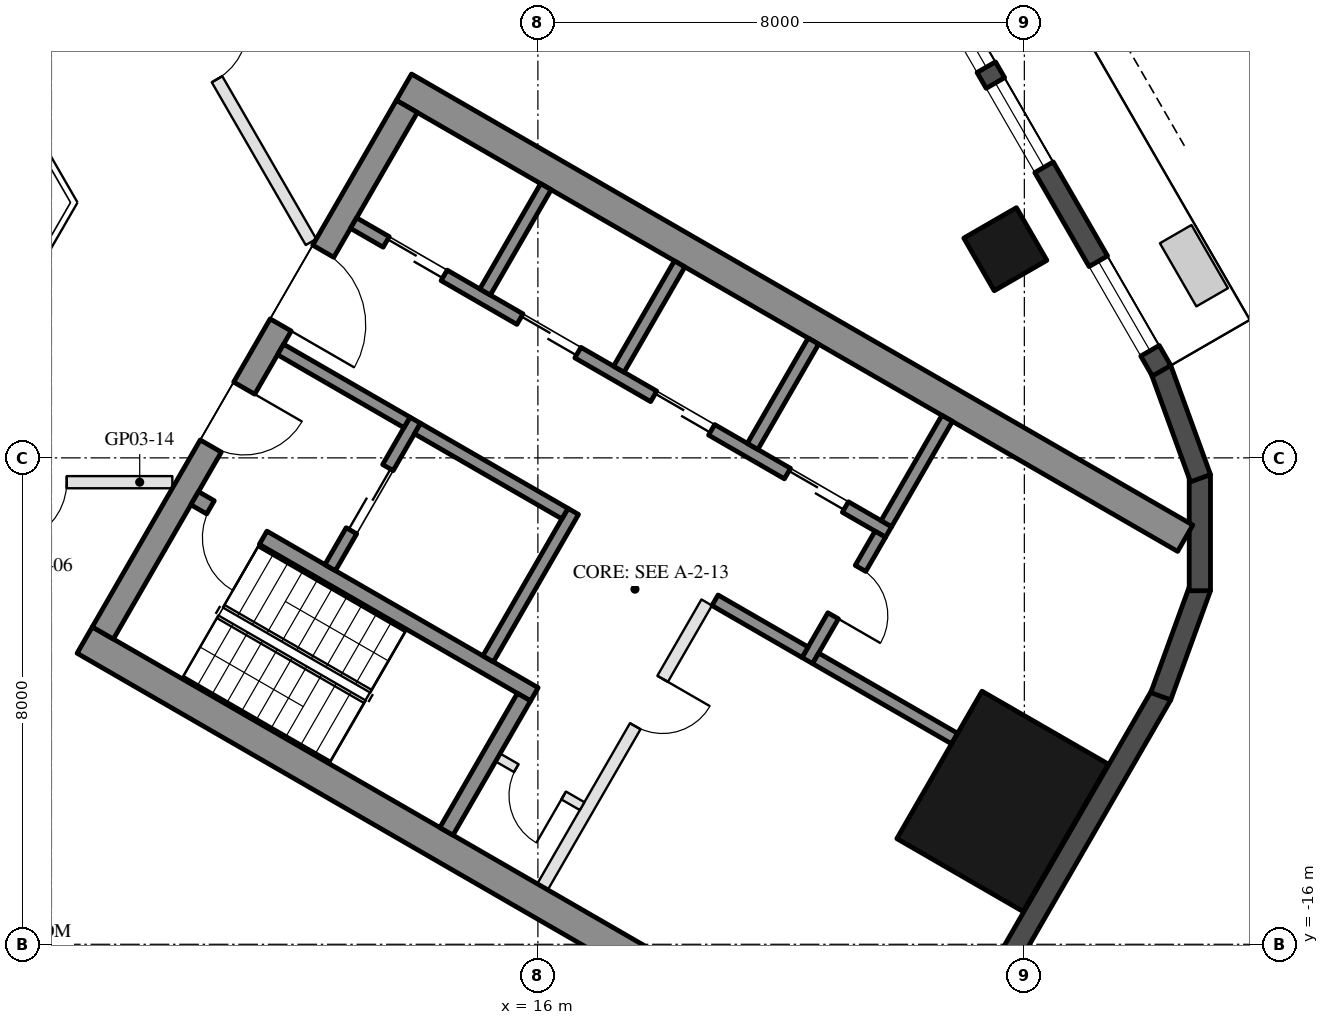
"""IFC4 building model, lengths in metres.
Left out: names, types, materials, properties, quantities, classifications, styles, units other than length and angle.
Written with IfcOpenShell. Run it as: python <this file> out.ifc"""

import sys

from ifc_helpers import new_model, si_unit, direction, frame, frame_2d, origin, origin_2d, place, context, subcontext, project, spatial, rectangle, hollow_rectangle, extrude, element, fill, save


model = new_model("IFC4")
c1 = context("Model", 3, precision=1e-05, world=origin(), true_north=direction((0.0, 1.0)))
c2 = subcontext(c1, "Body", "Model", "MODEL_VIEW")
j1 = project(units=[si_unit("LENGTHUNIT", "METRE"), si_unit("PLANEANGLEUNIT", "RADIAN")], contexts=[c1])
p1 = place(None, origin())
s1 = spatial("IfcSite", under=j1, at=p1, CompositionType="ELEMENT")
p2 = place(p1, origin())
s2 = spatial("IfcBuilding", under=s1, at=p2, CompositionType="ELEMENT")
p3 = place(p2, frame((0.0, 0.0, 68.7)))
s3 = spatial("IfcBuildingStorey", under=s2, at=p3, CompositionType="ELEMENT", Elevation=68.7)
p4 = place(p3, frame((23.688, -4.568, 0.0), z_axis=(0.0, 0.0, 1.0), x_axis=(-0.5, 0.866025403784, 0.0)))
e1 = element("IfcColumn", 1, at=p4, inside=s3, PredefinedType="COLUMN", context=c2, shape_type="SweptSolid", body=[
    extrude(hollow_rectangle(XDim=1.0, YDim=1.0, WallThickness=0.045, at=origin_2d()), origin(), (0.0, 0.0, 1.0), 3.7),
])
p5 = place(p3, frame((23.643, -13.65, 0.0), z_axis=(0.0, 0.0, 1.0), x_axis=(0.5, 0.866025403784, 0.0)))
e2 = element("IfcColumn", 2, at=p5, inside=s3, PredefinedType="COLUMN", context=c2, shape_type="SweptSolid", body=[
    extrude(hollow_rectangle(XDim=2.8, YDim=2.4, WallThickness=0.07, at=origin_2d()), origin(), (0.0, 0.0, 1.0), 3.7),
])
p6 = place(p3, frame((23.427, -16.792, 0.0), z_axis=(0.0, 0.0, 1.0), x_axis=(0.500018773155, 0.866014564827, 0.0)))
e3 = element("IfcWall", 3, at=p6, inside=s3, PredefinedType="SOLIDWALL", context=c2, shape_type="SweptSolid", body=[
    extrude(rectangle(XDim=5.658, YDim=0.35, at=frame_2d((2.829, 0.0))), origin(), (0.0, 0.0, 1.0), 3.55),
])
for number, where, z_axis, x_axis in (
    (4, (26.244, -11.92, 0.0), (0.0, 0.0, 1.0), (0.342, 0.94, 0.0)),
    (5, (26.886, -10.185, 0.0), (0.0, 0.0, 1.0), (0.0, 1.0, 0.0)),
    (6, (26.897, -8.335, 0.0), (0.0, 0.0, 1.0), (-0.342, 0.94, 0.0)),
):
    element("IfcWall", number, at=place(p3, frame(where, z_axis=z_axis, x_axis=x_axis)), inside=s3, PredefinedType="SOLIDWALL", context=c2, shape_type="SweptSolid", body=[
        extrude(rectangle(XDim=1.91, YDim=0.35, at=frame_2d((0.955, 0.0))), origin(), (0.0, 0.0, 1.0), 3.55),
    ])
p7 = place(p3, frame((26.257, -6.567, 0.0), z_axis=(0.0, 0.0, 1.0), x_axis=(-0.500023526245, 0.866011820475, 0.0)))
e7 = element("IfcWall", 7, at=p7, inside=s3, PredefinedType="SOLIDWALL", context=c2, shape_type="SweptSolid", body=[
    extrude(rectangle(XDim=11.816, YDim=0.35, at=frame_2d((5.908, 0.0))), origin(), (0.0, 0.0, 1.0), 3.55),
])
p8 = place(p7, frame((0.38, 0.0, 0.3)))
e8 = element("IfcOpeningElement", 8, at=p8, cuts=e7, PredefinedType="OPENING", context=c2, shape_type="SweptSolid", body=[
    extrude(rectangle(XDim=1.7, YDim=2.65, at=frame_2d((0.85, 1.325))), frame((0.0, 0.185, 0.0), z_axis=(0.0, -1.0, 0.0), x_axis=(1.0, 0.0, 0.0)), (0.0, 0.0, 1.0), 0.37),
])
p9 = place(p7, frame((7.666, 0.0, 0.0)))
e9 = element("IfcOpeningElement", 9, at=p9, cuts=e7, PredefinedType="OPENING", context=c2, shape_type="SweptSolid", body=[
    extrude(rectangle(XDim=2.4, YDim=2.4, at=frame_2d((1.2, 1.2))), frame((0.0, 0.185, 0.0), z_axis=(0.0, -1.0, 0.0), x_axis=(1.0, 0.0, 0.0)), (0.0, 0.0, 1.0), 0.37),
])
p10 = place(p7, frame((3.865, 0.0, 0.3)))
e10 = element("IfcOpeningElement", 10, at=p10, cuts=e7, PredefinedType="OPENING", context=c2, shape_type="SweptSolid", body=[
    extrude(rectangle(XDim=1.6, YDim=2.65, at=frame_2d((0.8, 1.325))), frame((0.0, 0.185, 0.0), z_axis=(0.0, -1.0, 0.0), x_axis=(1.0, 0.0, 0.0)), (0.0, 0.0, 1.0), 0.37),
])
p11 = place(p7, frame((5.765, 0.0, 0.3)))
e11 = element("IfcOpeningElement", 11, at=p11, cuts=e7, PredefinedType="OPENING", context=c2, shape_type="SweptSolid", body=[
    extrude(rectangle(XDim=1.6, YDim=2.65, at=frame_2d((0.8, 1.325))), frame((0.0, 0.185, 0.0), z_axis=(0.0, -1.0, 0.0), x_axis=(1.0, 0.0, 0.0)), (0.0, 0.0, 1.0), 0.37),
])
for number, where, z_axis, x_axis in (
    (12, (8.547, -10.997, 0.0), (0.0, 0.0, 1.0), (0.866, -0.5, 0.0)),
    (13, (13.797, -1.903, 0.0), (0.0, 0.0, 1.0), (0.866, -0.5, 0.0)),
):
    element("IfcWall", number, at=place(p3, frame(where, z_axis=z_axis, x_axis=x_axis)), inside=s3, PredefinedType="SHEAR", context=c2, shape_type="SweptSolid", body=[
        extrude(rectangle(XDim=14.837, YDim=0.5, at=frame_2d((7.418, 0.0))), origin(), (0.0, 0.0, 1.0), 3.5),
    ])
p12 = place(p3, frame((8.845, -10.88, 0.0), z_axis=(0.0, 0.0, 1.0), x_axis=(0.500004234368, 0.866022959057, 0.0)))
e14 = element("IfcWall", 14, at=p12, inside=s3, PredefinedType="SHEAR", context=c2, shape_type="SweptSolid", body=[
    extrude(rectangle(XDim=10.0, YDim=0.4, at=frame_2d((5.0, 0.0))), origin(), (0.0, 0.0, 1.0), 3.5),
])
p13 = place(p12, frame((3.55, 0.0, 0.0)))
e15 = element("IfcOpeningElement", 15, at=p13, cuts=e14, PredefinedType="OPENING", context=c2, shape_type="SweptSolid", body=[
    extrude(rectangle(XDim=1.1, YDim=2.1, at=frame_2d((0.55, 1.05))), frame((0.0, 0.21, 0.0), z_axis=(0.0, -1.0, 0.0), x_axis=(1.0, 0.0, 0.0)), (0.0, 0.0, 1.0), 0.42),
])
p14 = place(p12, frame((5.85, 0.0, 0.0)))
e16 = element("IfcOpeningElement", 16, at=p14, cuts=e14, PredefinedType="OPENING", context=c2, shape_type="SweptSolid", body=[
    extrude(rectangle(XDim=1.4, YDim=2.1, at=frame_2d((0.7, 1.05))), frame((0.0, 0.21, 0.0), z_axis=(0.0, -1.0, 0.0), x_axis=(1.0, 0.0, 0.0)), (0.0, 0.0, 1.0), 0.42),
])
p15 = place(p3, frame((10.356, -8.664, 0.0), z_axis=(0.0, 0.0, 1.0), x_axis=(0.866028629588, -0.499994412703, 0.0)))
e17 = element("IfcWall", 17, at=p15, inside=s3, PredefinedType="SHEAR", context=c2, shape_type="SweptSolid", body=[
    extrude(rectangle(XDim=6.45, YDim=0.25, at=frame_2d((3.225, 0.0))), origin(), (0.0, 0.0, 1.0), 3.5),
])
p16 = place(p15, frame((0.3, 0.0, 0.0)))
e18 = element("IfcOpeningElement", 18, at=p16, cuts=e17, PredefinedType="OPENING", context=c2, shape_type="SweptSolid", body=[
    extrude(rectangle(XDim=1.0, YDim=2.1, at=frame_2d((0.5, 1.05))), frame((0.0, 0.135, 0.0), z_axis=(0.0, -1.0, 0.0), x_axis=(1.0, 0.0, 0.0)), (0.0, 0.0, 1.0), 0.27),
])
p17 = place(p3, frame((14.496, -14.143, 0.0), z_axis=(0.0, 0.0, 1.0), x_axis=(0.500062241894, 0.865989465428, 0.0)))
e19 = element("IfcWall", 19, at=p17, inside=s3, PredefinedType="SHEAR", context=c2, shape_type="SweptSolid", body=[
    extrude(rectangle(XDim=2.55, YDim=0.25, at=frame_2d((1.275, 0.0))), origin(), (0.0, 0.0, 1.0), 3.5),
])
p18 = place(p3, frame((15.181, -11.305, 0.0), z_axis=(0.0, 0.0, 1.0), x_axis=(0.49994636267, 0.866056369097, 0.0)))
e20 = element("IfcWall", 20, at=p18, inside=s3, PredefinedType="SHEAR", context=c2, shape_type="SweptSolid", body=[
    extrude(rectangle(XDim=2.8, YDim=0.2, at=frame_2d((1.4, 0.0))), origin(), (0.0, 0.0, 1.0), 3.5),
])
p19 = place(p3, frame((12.583, -9.805, 0.0), z_axis=(0.0, 0.0, 1.0), x_axis=(0.49994636267, 0.866056369097, 0.0)))
e21 = element("IfcWall", 21, at=p19, inside=s3, PredefinedType="SHEAR", context=c2, shape_type="SweptSolid", body=[
    extrude(rectangle(XDim=2.8, YDim=0.2, at=frame_2d((1.4, 0.0))), origin(), (0.0, 0.0, 1.0), 3.5),
])
p20 = place(p19, frame((0.7, 0.0, 0.0)))
e22 = element("IfcOpeningElement", 22, at=p20, cuts=e21, PredefinedType="OPENING", context=c2, shape_type="SweptSolid", body=[
    extrude(rectangle(XDim=1.2, YDim=2.1, at=frame_2d((0.6, 1.05))), frame((0.0, 0.11, 0.0), z_axis=(0.0, -1.0, 0.0), x_axis=(1.0, 0.0, 0.0)), (0.0, 0.0, 1.0), 0.22),
])
p21 = place(p3, frame((11.768, -6.217, 0.0), z_axis=(0.0, 0.0, 1.0), x_axis=(0.866050077142, -0.499957262057, 0.0)))
e23 = element("IfcWall", 23, at=p21, inside=s3, PredefinedType="SHEAR", context=c2, shape_type="SweptSolid", body=[
    extrude(rectangle(XDim=2.4, YDim=0.2, at=frame_2d((1.2, 0.0))), origin(), (0.0, 0.0, 1.0), 3.5),
])
p22 = place(p3, frame((14.02, -7.517, 0.0), z_axis=(0.0, 0.0, 1.0), x_axis=(0.866034573852, -0.49998411664, 0.0)))
e24 = element("IfcWall", 24, at=p22, inside=s3, PredefinedType="SHEAR", context=c2, shape_type="SweptSolid", body=[
    extrude(rectangle(XDim=2.8, YDim=0.2, at=frame_2d((1.4, 0.0))), origin(), (0.0, 0.0, 1.0), 3.5),
])
p23 = place(p3, frame((12.968, -4.138, 0.0), z_axis=(0.0, 0.0, 1.0), x_axis=(0.866028328073, -0.49999493495, 0.0)))
e25 = element("IfcWall", 25, at=p23, inside=s3, PredefinedType="SHEAR", context=c2, shape_type="SweptSolid", body=[
    extrude(rectangle(XDim=10.16, YDim=0.2, at=frame_2d((5.08, 0.0))), origin(), (0.0, 0.0, 1.0), 3.5),
])
p24 = place(p23, frame((0.62, 0.0, 0.0)))
e26 = element("IfcOpeningElement", 26, at=p24, cuts=e25, PredefinedType="OPENING", context=c2, shape_type="SweptSolid", body=[
    extrude(rectangle(XDim=1.1, YDim=2.1, at=frame_2d((0.55, 1.05))), frame((0.0, 0.11, 0.0), z_axis=(0.0, -1.0, 0.0), x_axis=(1.0, 0.0, 0.0)), (0.0, 0.0, 1.0), 0.22),
])
p25 = place(p23, frame((3.16, 0.0, 0.0)))
e27 = element("IfcOpeningElement", 27, at=p25, cuts=e25, PredefinedType="OPENING", context=c2, shape_type="SweptSolid", body=[
    extrude(rectangle(XDim=1.1, YDim=2.1, at=frame_2d((0.55, 1.05))), frame((0.0, 0.11, 0.0), z_axis=(0.0, -1.0, 0.0), x_axis=(1.0, 0.0, 0.0)), (0.0, 0.0, 1.0), 0.22),
])
p26 = place(p23, frame((5.7, 0.0, 0.0)))
e28 = element("IfcOpeningElement", 28, at=p26, cuts=e25, PredefinedType="OPENING", context=c2, shape_type="SweptSolid", body=[
    extrude(rectangle(XDim=1.1, YDim=2.1, at=frame_2d((0.55, 1.05))), frame((0.0, 0.11, 0.0), z_axis=(0.0, -1.0, 0.0), x_axis=(1.0, 0.0, 0.0)), (0.0, 0.0, 1.0), 0.22),
])
p27 = place(p23, frame((8.24, 0.0, 0.0)))
e29 = element("IfcOpeningElement", 29, at=p27, cuts=e25, PredefinedType="OPENING", context=c2, shape_type="SweptSolid", body=[
    extrude(rectangle(XDim=1.1, YDim=2.1, at=frame_2d((0.55, 1.05))), frame((0.0, 0.11, 0.0), z_axis=(0.0, -1.0, 0.0), x_axis=(1.0, 0.0, 0.0)), (0.0, 0.0, 1.0), 0.22),
])
p28 = place(p3, frame((20.43, -11.333, 0.0), z_axis=(0.0, 0.0, 1.0), x_axis=(0.500001309137, 0.866024647952, 0.0)))
e30 = element("IfcWall", 30, at=p28, inside=s3, PredefinedType="SHEAR", context=c2, shape_type="SweptSolid", body=[
    extrude(rectangle(XDim=2.4, YDim=0.2, at=frame_2d((1.2, 0.0))), origin(), (0.0, 0.0, 1.0), 3.5),
])
p29 = place(p28, frame((0.85, 0.0, 0.0)))
e31 = element("IfcOpeningElement", 31, at=p29, cuts=e30, PredefinedType="OPENING", context=c2, shape_type="SweptSolid", body=[
    extrude(rectangle(XDim=0.9, YDim=2.1, at=frame_2d((0.45, 1.05))), frame((0.0, 0.11, 0.0), z_axis=(0.0, -1.0, 0.0), x_axis=(1.0, 0.0, 0.0)), (0.0, 0.0, 1.0), 0.22),
])
p30 = place(p3, frame((18.913, -10.342, 0.0), z_axis=(0.0, 0.0, 1.0), x_axis=(0.866038183914, -0.499977863513, 0.0)))
e32 = element("IfcWall", 32, at=p30, inside=s3, PredefinedType="SHEAR", context=c2, shape_type="SweptSolid", body=[
    extrude(rectangle(XDim=1.71, YDim=0.2, at=frame_2d((0.855, 0.0))), origin(), (0.0, 0.0, 1.0), 3.5),
])
for number, where, z_axis, x_axis in (
    (33, (15.131, -5.272, 0.0), (0.0, 0.0, 1.0), (0.5, 0.866, 0.0)),
    (34, (17.331, -6.542, 0.0), (0.0, 0.0, 1.0), (0.5, 0.866, 0.0)),
    (35, (19.531, -7.812, 0.0), (0.0, 0.0, 1.0), (0.5, 0.866, 0.0)),
    (36, (21.73, -9.082, 0.0), (0.0, 0.0, 1.0), (0.5, 0.866, 0.0)),
):
    element("IfcWall", number, at=place(p3, frame(where, z_axis=z_axis, x_axis=x_axis)), inside=s3, PredefinedType="SHEAR", context=c2, shape_type="SweptSolid", body=[
        extrude(rectangle(XDim=2.0, YDim=0.2, at=frame_2d((1.0, 0.0))), origin(), (0.0, 0.0, 1.0), 3.5),
    ])
p31 = place(p3, frame((20.567, -11.297, 0.0), z_axis=(0.0, 0.0, 1.0), x_axis=(0.866060851709, -0.499938597367, 0.0)))
e37 = element("IfcWall", 37, at=p31, inside=s3, PredefinedType="SHEAR", context=c2, shape_type="SweptSolid", body=[
    extrude(rectangle(XDim=2.64, YDim=0.2, at=frame_2d((1.32, 0.0))), origin(), (0.0, 0.0, 1.0), 3.5),
])
p32 = place(p3, frame((16.076, -15.055, 0.0), z_axis=(0.0, 0.0, 1.0), x_axis=(0.499995103361, 0.866028230842, 0.0)))
e38 = element("IfcWall", 38, at=p32, inside=s3, PredefinedType="PARTITIONING", context=c2, shape_type="SweptSolid", body=[
    extrude(rectangle(XDim=5.4, YDim=0.2, at=frame_2d((2.7, 0.0))), origin(), (0.0, 0.0, 1.0), 3.5),
])
p33 = place(p32, frame((3.05, 0.0, 0.0)))
e39 = element("IfcOpeningElement", 39, at=p33, cuts=e38, PredefinedType="OPENING", context=c2, shape_type="SweptSolid", body=[
    extrude(rectangle(XDim=0.9, YDim=2.1, at=frame_2d((0.45, 1.05))), frame((0.0, 0.11, 0.0), z_axis=(0.0, -1.0, 0.0), x_axis=(1.0, 0.0, 0.0)), (0.0, 0.0, 1.0), 0.22),
])
p34 = place(p3, frame((15.342, -12.928, 0.0), z_axis=(0.0, 0.0, 1.0), x_axis=(0.865989903783, -0.500061482766, 0.0)))
e40 = element("IfcWall", 40, at=p34, inside=s3, PredefinedType="PARTITIONING", context=c2, shape_type="SweptSolid", body=[
    extrude(rectangle(XDim=1.6, YDim=0.15, at=frame_2d((0.8, 0.0))), origin(), (0.0, 0.0, 1.0), 3.5),
])
p35 = place(p34, frame((0.35, 0.0, 0.0)))
e41 = element("IfcOpeningElement", 41, at=p35, cuts=e40, PredefinedType="OPENING", context=c2, shape_type="SweptSolid", body=[
    extrude(rectangle(XDim=0.9, YDim=2.1, at=frame_2d((0.45, 1.05))), frame((0.0, 0.085, 0.0), z_axis=(0.0, -1.0, 0.0), x_axis=(1.0, 0.0, 0.0)), (0.0, 0.0, 1.0), 0.17),
])
p36 = place(p3, frame((9.988, -8.4, 0.0), z_axis=(0.0, 0.0, 1.0), x_axis=(-1.0, 0.0, 0.0)))
e42 = element("IfcWall", 42, at=p36, inside=s3, PredefinedType="PARTITIONING", context=c2, shape_type="SweptSolid", body=[
    extrude(rectangle(XDim=4.474, YDim=0.2, at=frame_2d((2.237, 0.0))), origin(), (0.0, 0.0, 1.0), 2.95),
])
p37 = place(p36, frame((1.737, 0.0, 0.0)))
e43 = element("IfcOpeningElement", 43, at=p37, cuts=e42, PredefinedType="OPENING", context=c2, shape_type="SweptSolid", body=[
    extrude(rectangle(XDim=1.0, YDim=2.1, at=frame_2d((0.5, 1.05))), frame((0.0, 0.11, 0.0), z_axis=(0.0, -1.0, 0.0), x_axis=(1.0, 0.0, 0.0)), (0.0, 0.0, 1.0), 0.22),
])
p38 = place(p3, frame((8.677, 1.771, 0.0), z_axis=(0.0, 0.0, 1.0), x_axis=(0.50000293509, -0.866023709203, 0.0)))
e44 = element("IfcWall", 44, at=p38, inside=s3, PredefinedType="PARTITIONING", context=c2, shape_type="SweptSolid", body=[
    extrude(rectangle(XDim=7.183, YDim=0.2, at=frame_2d((3.592, 0.0))), origin(), (0.0, 0.0, 1.0), 2.95),
])
p39 = place(p38, frame((3.092, 0.0, 0.0)))
e45 = element("IfcOpeningElement", 45, at=p39, cuts=e44, PredefinedType="OPENING", context=c2, shape_type="SweptSolid", body=[
    extrude(rectangle(XDim=1.0, YDim=2.1, at=frame_2d((0.5, 1.05))), frame((0.0, 0.11, 0.0), z_axis=(0.0, -1.0, 0.0), x_axis=(1.0, 0.0, 0.0)), (0.0, 0.0, 1.0), 0.22),
])
p40 = place(p8, origin())
e46 = element("IfcWindow", 46, at=p40, inside=s3, PartitioningType="SINGLE_PANEL", PredefinedType="WINDOW", context=c2, shape_type="SweptSolid", body=[
    extrude(rectangle(XDim=1.7, YDim=2.65, at=frame_2d((0.85, 1.325))), frame((0.0, 0.03, 0.0), z_axis=(0.0, -1.0, 0.0), x_axis=(1.0, 0.0, 0.0)), (0.0, 0.0, 1.0), 0.06),
])
fill(e8, e46)
p41 = place(p10, origin())
e47 = element("IfcWindow", 47, at=p41, inside=s3, PartitioningType="SINGLE_PANEL", PredefinedType="WINDOW", context=c2, shape_type="SweptSolid", body=[
    extrude(rectangle(XDim=1.6, YDim=2.65, at=frame_2d((0.8, 1.325))), frame((0.0, 0.03, 0.0), z_axis=(0.0, -1.0, 0.0), x_axis=(1.0, 0.0, 0.0)), (0.0, 0.0, 1.0), 0.06),
])
fill(e10, e47)
p42 = place(p11, origin())
e48 = element("IfcWindow", 48, at=p42, inside=s3, PartitioningType="SINGLE_PANEL", PredefinedType="WINDOW", context=c2, shape_type="SweptSolid", body=[
    extrude(rectangle(XDim=1.6, YDim=2.65, at=frame_2d((0.8, 1.325))), frame((0.0, 0.03, 0.0), z_axis=(0.0, -1.0, 0.0), x_axis=(1.0, 0.0, 0.0)), (0.0, 0.0, 1.0), 0.06),
])
fill(e11, e48)
p43 = place(p20, origin())
e49 = element("IfcDoor", 49, at=p43, inside=s3, OperationType="DOUBLE_DOOR_SLIDING", PredefinedType="DOOR", context=c2, shape_type="SweptSolid", body=[
    extrude(rectangle(XDim=1.2, YDim=2.1, at=frame_2d((0.6, 1.05))), frame((0.0, 0.025, 0.0), z_axis=(0.0, -1.0, 0.0), x_axis=(1.0, 0.0, 0.0)), (0.0, 0.0, 1.0), 0.05),
])
fill(e22, e49)
p44 = place(p35, frame((0.9, 0.0, 0.0), z_axis=(0.0, 0.0, 1.0), x_axis=(-1.0, 0.0, 0.0)))
e50 = element("IfcDoor", 50, at=p44, inside=s3, OperationType="SINGLE_SWING_LEFT", PredefinedType="DOOR", context=c2, shape_type="SweptSolid", body=[
    extrude(rectangle(XDim=0.9, YDim=2.1, at=frame_2d((0.45, 1.05))), frame((0.0, 0.025, 0.0), z_axis=(0.0, -1.0, 0.0), x_axis=(1.0, 0.0, 0.0)), (0.0, 0.0, 1.0), 0.05),
])
fill(e41, e50)
p45 = place(p24, origin())
e51 = element("IfcDoor", 51, at=p45, inside=s3, OperationType="DOUBLE_DOOR_SLIDING", PredefinedType="DOOR", context=c2, shape_type="SweptSolid", body=[
    extrude(rectangle(XDim=1.1, YDim=2.1, at=frame_2d((0.55, 1.05))), frame((0.0, 0.025, 0.0), z_axis=(0.0, -1.0, 0.0), x_axis=(1.0, 0.0, 0.0)), (0.0, 0.0, 1.0), 0.05),
])
fill(e26, e51)
p46 = place(p25, origin())
e52 = element("IfcDoor", 52, at=p46, inside=s3, OperationType="DOUBLE_DOOR_SLIDING", PredefinedType="DOOR", context=c2, shape_type="SweptSolid", body=[
    extrude(rectangle(XDim=1.1, YDim=2.1, at=frame_2d((0.55, 1.05))), frame((0.0, 0.025, 0.0), z_axis=(0.0, -1.0, 0.0), x_axis=(1.0, 0.0, 0.0)), (0.0, 0.0, 1.0), 0.05),
])
fill(e27, e52)
p47 = place(p26, origin())
e53 = element("IfcDoor", 53, at=p47, inside=s3, OperationType="DOUBLE_DOOR_SLIDING", PredefinedType="DOOR", context=c2, shape_type="SweptSolid", body=[
    extrude(rectangle(XDim=1.1, YDim=2.1, at=frame_2d((0.55, 1.05))), frame((0.0, 0.025, 0.0), z_axis=(0.0, -1.0, 0.0), x_axis=(1.0, 0.0, 0.0)), (0.0, 0.0, 1.0), 0.05),
])
fill(e28, e53)
p48 = place(p27, origin())
e54 = element("IfcDoor", 54, at=p48, inside=s3, OperationType="DOUBLE_DOOR_SLIDING", PredefinedType="DOOR", context=c2, shape_type="SweptSolid", body=[
    extrude(rectangle(XDim=1.1, YDim=2.1, at=frame_2d((0.55, 1.05))), frame((0.0, 0.025, 0.0), z_axis=(0.0, -1.0, 0.0), x_axis=(1.0, 0.0, 0.0)), (0.0, 0.0, 1.0), 0.05),
])
fill(e29, e54)
p49 = place(p29, frame((0.9, 0.0, 0.0), z_axis=(0.0, 0.0, 1.0), x_axis=(-1.0, 0.0, 0.0)))
e55 = element("IfcDoor", 55, at=p49, inside=s3, OperationType="SINGLE_SWING_RIGHT", PredefinedType="DOOR", context=c2, shape_type="SweptSolid", body=[
    extrude(rectangle(XDim=0.9, YDim=2.1, at=frame_2d((0.45, 1.05))), frame((0.0, 0.025, 0.0), z_axis=(0.0, -1.0, 0.0), x_axis=(1.0, 0.0, 0.0)), (0.0, 0.0, 1.0), 0.05),
])
fill(e31, e55)
p50 = place(p33, frame((0.9, 0.0, 0.0), z_axis=(0.0, 0.0, 1.0), x_axis=(-1.0, 0.0, 0.0)))
e56 = element("IfcDoor", 56, at=p50, inside=s3, OperationType="SINGLE_SWING_LEFT", PredefinedType="DOOR", context=c2, shape_type="SweptSolid", body=[
    extrude(rectangle(XDim=0.9, YDim=2.1, at=frame_2d((0.45, 1.05))), frame((0.0, 0.025, 0.0), z_axis=(0.0, -1.0, 0.0), x_axis=(1.0, 0.0, 0.0)), (0.0, 0.0, 1.0), 0.05),
])
fill(e39, e56)
p51 = place(p13, frame((1.1, 0.0, 0.0), z_axis=(0.0, 0.0, 1.0), x_axis=(-1.0, 0.0, 0.0)))
e57 = element("IfcDoor", 57, at=p51, inside=s3, OperationType="SINGLE_SWING_LEFT", PredefinedType="DOOR", context=c2, shape_type="SweptSolid", body=[
    extrude(rectangle(XDim=1.1, YDim=2.1, at=frame_2d((0.55, 1.05))), frame((0.0, 0.025, 0.0), z_axis=(0.0, -1.0, 0.0), x_axis=(1.0, 0.0, 0.0)), (0.0, 0.0, 1.0), 0.05),
])
fill(e15, e57)
p52 = place(p14, frame((1.4, 0.0, 0.0), z_axis=(0.0, 0.0, 1.0), x_axis=(-1.0, 0.0, 0.0)))
e58 = element("IfcDoor", 58, at=p52, inside=s3, OperationType="DOUBLE_DOOR_SINGLE_SWING", PredefinedType="DOOR", context=c2, shape_type="SweptSolid", body=[
    extrude(rectangle(XDim=1.4, YDim=2.1, at=frame_2d((0.7, 1.05))), frame((0.0, 0.025, 0.0), z_axis=(0.0, -1.0, 0.0), x_axis=(1.0, 0.0, 0.0)), (0.0, 0.0, 1.0), 0.05),
])
fill(e16, e58)
p53 = place(p16, frame((1.0, 0.0, 0.0), z_axis=(0.0, 0.0, 1.0), x_axis=(-1.0, 0.0, 0.0)))
e59 = element("IfcDoor", 59, at=p53, inside=s3, OperationType="SINGLE_SWING_LEFT", PredefinedType="DOOR", context=c2, shape_type="SweptSolid", body=[
    extrude(rectangle(XDim=1.0, YDim=2.1, at=frame_2d((0.5, 1.05))), frame((0.0, 0.025, 0.0), z_axis=(0.0, -1.0, 0.0), x_axis=(1.0, 0.0, 0.0)), (0.0, 0.0, 1.0), 0.05),
])
fill(e18, e59)
p54 = place(p37, origin())
e60 = element("IfcDoor", 60, at=p54, inside=s3, OperationType="SINGLE_SWING_RIGHT", PredefinedType="DOOR", context=c2, shape_type="SweptSolid", body=[
    extrude(rectangle(XDim=1.0, YDim=2.1, at=frame_2d((0.5, 1.05))), frame((0.0, 0.025, 0.0), z_axis=(0.0, -1.0, 0.0), x_axis=(1.0, 0.0, 0.0)), (0.0, 0.0, 1.0), 0.05),
])
fill(e43, e60)
p55 = place(p39, origin())
e61 = element("IfcDoor", 61, at=p55, inside=s3, OperationType="SINGLE_SWING_LEFT", PredefinedType="DOOR", context=c2, shape_type="SweptSolid", body=[
    extrude(rectangle(XDim=1.0, YDim=2.1, at=frame_2d((0.5, 1.05))), frame((0.0, 0.025, 0.0), z_axis=(0.0, -1.0, 0.0), x_axis=(1.0, 0.0, 0.0)), (0.0, 0.0, 1.0), 0.05),
])
fill(e45, e61)
save(model, sys.argv[1])
